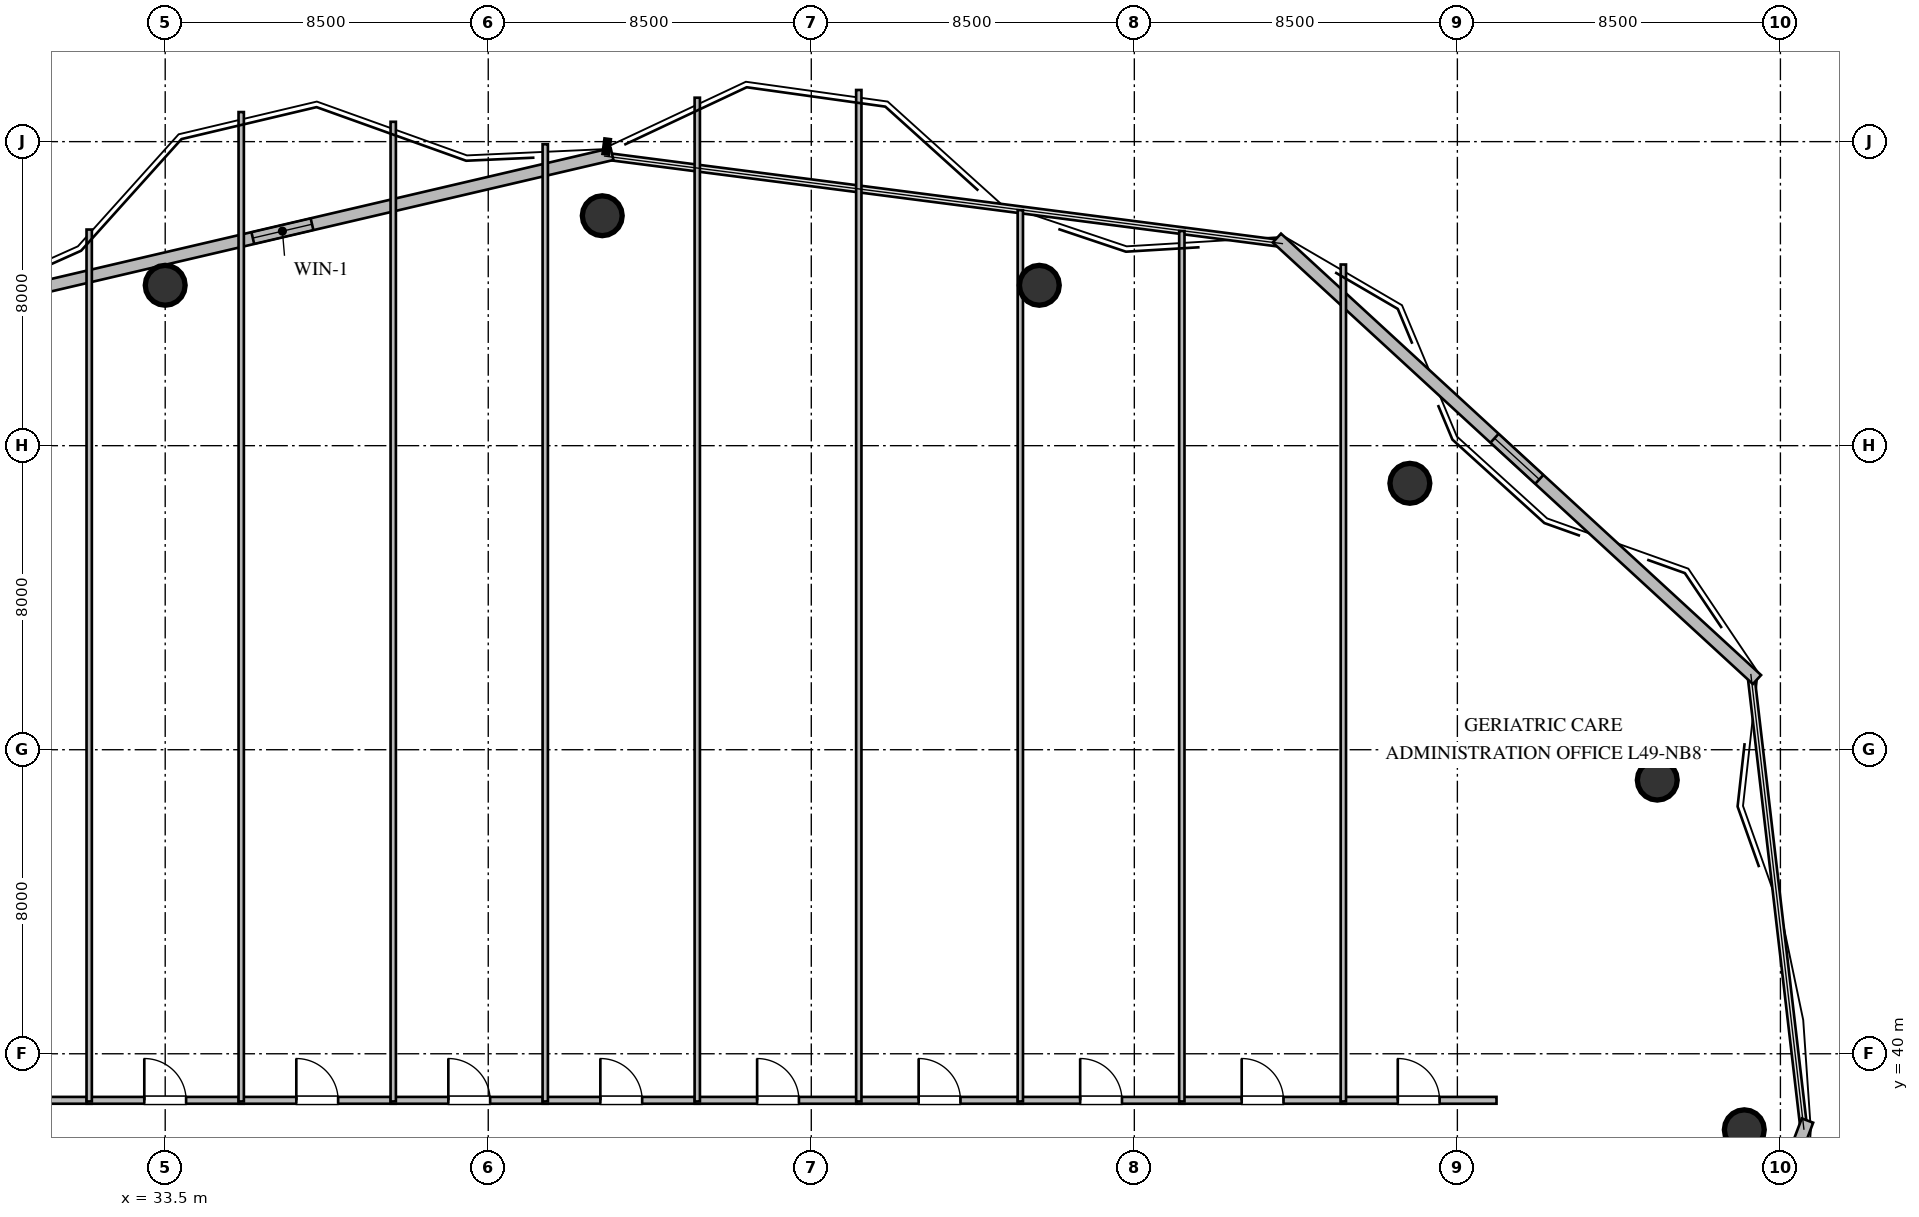
"""IFC4 building model, lengths in metres.
Left out: names, types, materials, properties, quantities, classifications, styles, units other than length and angle.
Written with IfcOpenShell. Run it as: python <this file> out.ifc"""

import sys

from ifc_helpers import new_model, si_unit, direction, frame, frame_2d, origin, origin_2d, place, context, subcontext, project, spatial, rectangle, circle, extrude, element, fill, save


model = new_model("IFC4")
c1 = context("Model", 3, precision=1e-05, world=origin(), true_north=direction((0.0, 1.0)))
c2 = subcontext(c1, "Body", "Model", "MODEL_VIEW")
j1 = project(units=[si_unit("LENGTHUNIT", "METRE"), si_unit("PLANEANGLEUNIT", "RADIAN")], contexts=[c1])
p1 = place(None, origin())
s1 = spatial("IfcSite", under=j1, at=p1, CompositionType="ELEMENT")
p2 = place(p1, origin())
s2 = spatial("IfcBuilding", under=s1, at=p2, CompositionType="ELEMENT")
p3 = place(p2, frame((0.0, 0.0, 187.2)))
s3 = spatial("IfcBuildingStorey", under=s2, at=p3, CompositionType="ELEMENT", Elevation=187.2)
for number, where, z_axis, x_axis in (
    (1, (75.05, 38.0, -0.24), (0.0, 0.0, 1.0), (1.0, 0.0, 0.0)),
    (2, (72.76, 47.2, -0.24), (0.0, 0.0, 1.0), (1.0, 0.0, 0.0)),
    (3, (66.25, 55.01, -0.24), (0.0, 0.0, 1.0), (1.0, 0.0, 0.0)),
    (4, (56.5, 60.22, -0.24), (0.0, 0.0, 1.0), (1.0, 0.0, 0.0)),
    (5, (45.0, 62.05, -0.24), (0.0, 0.0, 1.0), (1.0, 0.0, 0.0)),
    (6, (33.5, 60.22, -0.24), (0.0, 0.0, 1.0), (1.0, 0.0, 0.0)),
):
    element("IfcColumn", number, at=place(p3, frame(where, z_axis=z_axis, x_axis=x_axis)), inside=s3, PredefinedType="COLUMN", context=c2, shape_type="SweptSolid", body=[
        extrude(circle(Radius=0.525, at=origin_2d()), origin(), (0.0, 0.0, 1.0), 3.84),
    ])
p4 = place(p3, frame((76.712, 38.243, 0.0), z_axis=(0.0, 0.0, 1.0), x_axis=(-0.353659523244, -0.935374225441, 0.0)))
e7 = element("IfcWall", 7, at=p4, inside=s3, PredefinedType="STANDARD", context=c2, shape_type="SweptSolid", body=[
    extrude(rectangle(XDim=14.172, YDim=0.32, at=frame_2d((7.086, 0.0))), origin(), (0.0, 0.0, 1.0), 3.28),
])
p5 = place(p3, frame((27.909, 59.617, 0.0), z_axis=(0.0, 0.0, 1.0), x_axis=(0.973753606594, 0.227604731158, 0.0)))
e8 = element("IfcWall", 8, at=p5, inside=s3, PredefinedType="STANDARD", context=c2, shape_type="SweptSolid", body=[
    extrude(rectangle(XDim=17.817, YDim=0.32, at=frame_2d((8.908, 0.0))), origin(), (0.0, 0.0, 1.0), 3.28),
])
p6 = place(p5, frame((8.109, 0.0, 1.05)))
e9 = element("IfcOpeningElement", 9, at=p6, cuts=e8, PredefinedType="OPENING", context=c2, shape_type="SweptSolid", body=[
    extrude(rectangle(XDim=1.6, YDim=1.5, at=frame_2d((0.8, 0.75))), frame((0.0, 0.17, 0.0), z_axis=(0.0, -1.0, 0.0), x_axis=(1.0, 0.0, 0.0)), (0.0, 0.0, 1.0), 0.34),
])
p7 = place(p3, frame((62.751, 61.463, 0.0), z_axis=(0.0, 0.0, 1.0), x_axis=(0.736063690764, -0.676912286149, 0.0)))
e10 = element("IfcWall", 10, at=p7, inside=s3, PredefinedType="STANDARD", context=c2, shape_type="SweptSolid", body=[
    extrude(rectangle(XDim=17.162, YDim=0.32, at=frame_2d((8.581, 0.0))), origin(), (0.0, 0.0, 1.0), 3.28),
])
p8 = place(p7, frame((7.781, 0.0, 1.05)))
e11 = element("IfcOpeningElement", 11, at=p8, cuts=e10, PredefinedType="OPENING", context=c2, shape_type="SweptSolid", body=[
    extrude(rectangle(XDim=1.6, YDim=1.5, at=frame_2d((0.8, 0.75))), frame((0.0, 0.17, 0.0), z_axis=(0.0, -1.0, 0.0), x_axis=(1.0, 0.0, 0.0)), (0.0, 0.0, 1.0), 0.34),
])
p9 = place(p3, frame((27.685, 38.775, 0.0), z_axis=(0.0, 0.0, 1.0), x_axis=(1.0, 0.0, 0.0)))
e12 = element("IfcWall", 12, at=p9, inside=s3, PredefinedType="PARTITIONING", context=c2, shape_type="SweptSolid", body=[
    extrude(rectangle(XDim=3.88, YDim=0.18, at=frame_2d((1.94, 0.0))), origin(), (0.0, 0.0, 1.0), 3.28),
])
p10 = place(p9, frame((1.39, 0.0, 0.0)))
e13 = element("IfcOpeningElement", 13, at=p10, cuts=e12, PredefinedType="OPENING", context=c2, shape_type="SweptSolid", body=[
    extrude(rectangle(XDim=1.1, YDim=2.1, at=frame_2d((0.55, 1.05))), frame((0.0, 0.1, 0.0), z_axis=(0.0, -1.0, 0.0), x_axis=(1.0, 0.0, 0.0)), (0.0, 0.0, 1.0), 0.2),
])
p11 = place(p3, frame((31.435, 38.775, 0.0), z_axis=(0.0, 0.0, 1.0), x_axis=(1.0, 0.0, 0.0)))
e14 = element("IfcWall", 14, at=p11, inside=s3, PredefinedType="PARTITIONING", context=c2, shape_type="SweptSolid", body=[
    extrude(rectangle(XDim=4.13, YDim=0.18, at=frame_2d((2.065, 0.0))), origin(), (0.0, 0.0, 1.0), 3.28),
])
p12 = place(p11, frame((1.515, 0.0, 0.0)))
e15 = element("IfcOpeningElement", 15, at=p12, cuts=e14, PredefinedType="OPENING", context=c2, shape_type="SweptSolid", body=[
    extrude(rectangle(XDim=1.1, YDim=2.1, at=frame_2d((0.55, 1.05))), frame((0.0, 0.1, 0.0), z_axis=(0.0, -1.0, 0.0), x_axis=(1.0, 0.0, 0.0)), (0.0, 0.0, 1.0), 0.2),
])
p13 = place(p3, frame((35.435, 38.775, 0.0), z_axis=(0.0, 0.0, 1.0), x_axis=(1.0, 0.0, 0.0)))
e16 = element("IfcWall", 16, at=p13, inside=s3, PredefinedType="PARTITIONING", context=c2, shape_type="SweptSolid", body=[
    extrude(rectangle(XDim=4.13, YDim=0.18, at=frame_2d((2.065, 0.0))), origin(), (0.0, 0.0, 1.0), 3.28),
])
p14 = place(p13, frame((1.515, 0.0, 0.0)))
e17 = element("IfcOpeningElement", 17, at=p14, cuts=e16, PredefinedType="OPENING", context=c2, shape_type="SweptSolid", body=[
    extrude(rectangle(XDim=1.1, YDim=2.1, at=frame_2d((0.55, 1.05))), frame((0.0, 0.1, 0.0), z_axis=(0.0, -1.0, 0.0), x_axis=(1.0, 0.0, 0.0)), (0.0, 0.0, 1.0), 0.2),
])
p15 = place(p3, frame((39.435, 38.775, 0.0), z_axis=(0.0, 0.0, 1.0), x_axis=(1.0, 0.0, 0.0)))
e18 = element("IfcWall", 18, at=p15, inside=s3, PredefinedType="PARTITIONING", context=c2, shape_type="SweptSolid", body=[
    extrude(rectangle(XDim=4.13, YDim=0.18, at=frame_2d((2.065, 0.0))), origin(), (0.0, 0.0, 1.0), 3.28),
])
p16 = place(p15, frame((1.515, 0.0, 0.0)))
e19 = element("IfcOpeningElement", 19, at=p16, cuts=e18, PredefinedType="OPENING", context=c2, shape_type="SweptSolid", body=[
    extrude(rectangle(XDim=1.1, YDim=2.1, at=frame_2d((0.55, 1.05))), frame((0.0, 0.1, 0.0), z_axis=(0.0, -1.0, 0.0), x_axis=(1.0, 0.0, 0.0)), (0.0, 0.0, 1.0), 0.2),
])
p17 = place(p3, frame((43.435, 38.775, 0.0), z_axis=(0.0, 0.0, 1.0), x_axis=(1.0, 0.0, 0.0)))
e20 = element("IfcWall", 20, at=p17, inside=s3, PredefinedType="PARTITIONING", context=c2, shape_type="SweptSolid", body=[
    extrude(rectangle(XDim=4.13, YDim=0.18, at=frame_2d((2.065, 0.0))), origin(), (0.0, 0.0, 1.0), 3.28),
])
p18 = place(p17, frame((1.515, 0.0, 0.0)))
e21 = element("IfcOpeningElement", 21, at=p18, cuts=e20, PredefinedType="OPENING", context=c2, shape_type="SweptSolid", body=[
    extrude(rectangle(XDim=1.1, YDim=2.1, at=frame_2d((0.55, 1.05))), frame((0.0, 0.1, 0.0), z_axis=(0.0, -1.0, 0.0), x_axis=(1.0, 0.0, 0.0)), (0.0, 0.0, 1.0), 0.2),
])
p19 = place(p3, frame((47.435, 38.775, 0.0), z_axis=(0.0, 0.0, 1.0), x_axis=(1.0, 0.0, 0.0)))
e22 = element("IfcWall", 22, at=p19, inside=s3, PredefinedType="PARTITIONING", context=c2, shape_type="SweptSolid", body=[
    extrude(rectangle(XDim=4.38, YDim=0.18, at=frame_2d((2.19, 0.0))), origin(), (0.0, 0.0, 1.0), 3.28),
])
p20 = place(p19, frame((1.64, 0.0, 0.0)))
e23 = element("IfcOpeningElement", 23, at=p20, cuts=e22, PredefinedType="OPENING", context=c2, shape_type="SweptSolid", body=[
    extrude(rectangle(XDim=1.1, YDim=2.1, at=frame_2d((0.55, 1.05))), frame((0.0, 0.1, 0.0), z_axis=(0.0, -1.0, 0.0), x_axis=(1.0, 0.0, 0.0)), (0.0, 0.0, 1.0), 0.2),
])
p21 = place(p3, frame((51.685, 38.775, 0.0), z_axis=(0.0, 0.0, 1.0), x_axis=(1.0, 0.0, 0.0)))
e24 = element("IfcWall", 24, at=p21, inside=s3, PredefinedType="PARTITIONING", context=c2, shape_type="SweptSolid", body=[
    extrude(rectangle(XDim=4.38, YDim=0.18, at=frame_2d((2.19, 0.0))), origin(), (0.0, 0.0, 1.0), 3.28),
])
p22 = place(p21, frame((1.64, 0.0, 0.0)))
e25 = element("IfcOpeningElement", 25, at=p22, cuts=e24, PredefinedType="OPENING", context=c2, shape_type="SweptSolid", body=[
    extrude(rectangle(XDim=1.1, YDim=2.1, at=frame_2d((0.55, 1.05))), frame((0.0, 0.1, 0.0), z_axis=(0.0, -1.0, 0.0), x_axis=(1.0, 0.0, 0.0)), (0.0, 0.0, 1.0), 0.2),
])
p23 = place(p3, frame((55.935, 38.775, 0.0), z_axis=(0.0, 0.0, 1.0), x_axis=(1.0, 0.0, 0.0)))
e26 = element("IfcWall", 26, at=p23, inside=s3, PredefinedType="PARTITIONING", context=c2, shape_type="SweptSolid", body=[
    extrude(rectangle(XDim=4.38, YDim=0.18, at=frame_2d((2.19, 0.0))), origin(), (0.0, 0.0, 1.0), 3.28),
])
p24 = place(p23, frame((1.64, 0.0, 0.0)))
e27 = element("IfcOpeningElement", 27, at=p24, cuts=e26, PredefinedType="OPENING", context=c2, shape_type="SweptSolid", body=[
    extrude(rectangle(XDim=1.1, YDim=2.1, at=frame_2d((0.55, 1.05))), frame((0.0, 0.1, 0.0), z_axis=(0.0, -1.0, 0.0), x_axis=(1.0, 0.0, 0.0)), (0.0, 0.0, 1.0), 0.2),
])
p25 = place(p3, frame((60.185, 38.775, 0.0), z_axis=(0.0, 0.0, 1.0), x_axis=(1.0, 0.0, 0.0)))
e28 = element("IfcWall", 28, at=p25, inside=s3, PredefinedType="PARTITIONING", context=c2, shape_type="SweptSolid", body=[
    extrude(rectangle(XDim=4.38, YDim=0.18, at=frame_2d((2.19, 0.0))), origin(), (0.0, 0.0, 1.0), 3.28),
])
p26 = place(p25, frame((1.64, 0.0, 0.0)))
e29 = element("IfcOpeningElement", 29, at=p26, cuts=e28, PredefinedType="OPENING", context=c2, shape_type="SweptSolid", body=[
    extrude(rectangle(XDim=1.1, YDim=2.1, at=frame_2d((0.55, 1.05))), frame((0.0, 0.1, 0.0), z_axis=(0.0, -1.0, 0.0), x_axis=(1.0, 0.0, 0.0)), (0.0, 0.0, 1.0), 0.2),
])
p27 = place(p3, frame((64.435, 38.775, 0.0), z_axis=(0.0, 0.0, 1.0), x_axis=(1.0, 0.0, 0.0)))
e30 = element("IfcWall", 30, at=p27, inside=s3, PredefinedType="PARTITIONING", context=c2, shape_type="SweptSolid", body=[
    extrude(rectangle(XDim=4.095, YDim=0.18, at=frame_2d((2.047, 0.0))), origin(), (0.0, 0.0, 1.0), 3.28),
])
p28 = place(p27, frame((1.497, 0.0, 0.0)))
e31 = element("IfcOpeningElement", 31, at=p28, cuts=e30, PredefinedType="OPENING", context=c2, shape_type="SweptSolid", body=[
    extrude(rectangle(XDim=1.1, YDim=2.1, at=frame_2d((0.55, 1.05))), frame((0.0, 0.1, 0.0), z_axis=(0.0, -1.0, 0.0), x_axis=(1.0, 0.0, 0.0)), (0.0, 0.0, 1.0), 0.2),
])
p29 = place(p3, frame((31.5, 61.687, 0.0), z_axis=(0.0, 0.0, 1.0), x_axis=(0.0, -1.0, 0.0)))
e32 = element("IfcWall", 32, at=p29, inside=s3, PredefinedType="PARTITIONING", context=c2, shape_type="SweptSolid", body=[
    extrude(rectangle(XDim=22.942, YDim=0.14, at=frame_2d((11.471, 0.0))), origin(), (0.0, 0.0, 1.0), 3.28),
])
p30 = place(p3, frame((35.5, 64.778, 0.0), z_axis=(0.0, 0.0, 1.0), x_axis=(0.0, -1.0, 0.0)))
e33 = element("IfcWall", 33, at=p30, inside=s3, PredefinedType="PARTITIONING", context=c2, shape_type="SweptSolid", body=[
    extrude(rectangle(XDim=26.033, YDim=0.14, at=frame_2d((13.017, 0.0))), origin(), (0.0, 0.0, 1.0), 2.81),
])
p31 = place(p3, frame((39.5, 64.522, 0.0), z_axis=(0.0, 0.0, 1.0), x_axis=(0.0, -1.0, 0.0)))
e34 = element("IfcWall", 34, at=p31, inside=s3, PredefinedType="PARTITIONING", context=c2, shape_type="SweptSolid", body=[
    extrude(rectangle(XDim=25.777, YDim=0.14, at=frame_2d((12.888, 0.0))), origin(), (0.0, 0.0, 1.0), 3.28),
])
p32 = place(p3, frame((43.5, 63.931, 0.0), z_axis=(0.0, 0.0, 1.0), x_axis=(0.0, -1.0, 0.0)))
e35 = element("IfcWall", 35, at=p32, inside=s3, PredefinedType="PARTITIONING", context=c2, shape_type="SweptSolid", body=[
    extrude(rectangle(XDim=25.186, YDim=0.14, at=frame_2d((12.593, 0.0))), origin(), (0.0, 0.0, 1.0), 2.81),
])
p33 = place(p3, frame((47.5, 65.156, 0.0), z_axis=(0.0, 0.0, 1.0), x_axis=(0.0, -1.0, 0.0)))
e36 = element("IfcWall", 36, at=p33, inside=s3, PredefinedType="PARTITIONING", context=c2, shape_type="SweptSolid", body=[
    extrude(rectangle(XDim=26.411, YDim=0.14, at=frame_2d((13.206, 0.0))), origin(), (0.0, 0.0, 1.0), 3.28),
])
p34 = place(p3, frame((51.75, 65.359, 0.0), z_axis=(0.0, 0.0, 1.0), x_axis=(0.0, -1.0, 0.0)))
e37 = element("IfcWall", 37, at=p34, inside=s3, PredefinedType="PARTITIONING", context=c2, shape_type="SweptSolid", body=[
    extrude(rectangle(XDim=26.614, YDim=0.14, at=frame_2d((13.307, 0.0))), origin(), (0.0, 0.0, 1.0), 3.28),
])
p35 = place(p3, frame((56.0, 62.197, 0.0), z_axis=(0.0, 0.0, 1.0), x_axis=(0.0, -1.0, 0.0)))
e38 = element("IfcWall", 38, at=p35, inside=s3, PredefinedType="PARTITIONING", context=c2, shape_type="SweptSolid", body=[
    extrude(rectangle(XDim=23.452, YDim=0.14, at=frame_2d((11.726, 0.0))), origin(), (0.0, 0.0, 1.0), 3.28),
])
p36 = place(p3, frame((60.25, 61.648, 0.0), z_axis=(0.0, 0.0, 1.0), x_axis=(0.0, -1.0, 0.0)))
e39 = element("IfcWall", 39, at=p36, inside=s3, PredefinedType="PARTITIONING", context=c2, shape_type="SweptSolid", body=[
    extrude(rectangle(XDim=22.903, YDim=0.14, at=frame_2d((11.451, 0.0))), origin(), (0.0, 0.0, 1.0), 2.916),
])
p37 = place(p3, frame((64.5, 60.767, 0.0), z_axis=(0.0, 0.0, 1.0), x_axis=(0.0, -1.0, 0.0)))
e40 = element("IfcWall", 40, at=p37, inside=s3, PredefinedType="PARTITIONING", context=c2, shape_type="SweptSolid", body=[
    extrude(rectangle(XDim=22.022, YDim=0.14, at=frame_2d((11.011, 0.0))), origin(), (0.0, 0.0, 1.0), 3.28),
])
p38 = place(p6, origin())
e41 = element("IfcWindow", 41, at=p38, inside=s3, PartitioningType="SINGLE_PANEL", PredefinedType="WINDOW", context=c2, shape_type="SweptSolid", body=[
    extrude(rectangle(XDim=1.6, YDim=1.5, at=frame_2d((0.8, 0.75))), frame((0.0, 0.03, 0.0), z_axis=(0.0, -1.0, 0.0), x_axis=(1.0, 0.0, 0.0)), (0.0, 0.0, 1.0), 0.06),
])
fill(e9, e41)
p39 = place(p8, origin())
e42 = element("IfcWindow", 42, at=p39, inside=s3, PartitioningType="SINGLE_PANEL", PredefinedType="WINDOW", context=c2, shape_type="SweptSolid", body=[
    extrude(rectangle(XDim=1.6, YDim=1.5, at=frame_2d((0.8, 0.75))), frame((0.0, 0.03, 0.0), z_axis=(0.0, -1.0, 0.0), x_axis=(1.0, 0.0, 0.0)), (0.0, 0.0, 1.0), 0.06),
])
fill(e11, e42)
p40 = place(p12, origin())
e43 = element("IfcDoor", 43, at=p40, inside=s3, OperationType="SINGLE_SWING_LEFT", PredefinedType="DOOR", context=c2, shape_type="SweptSolid", body=[
    extrude(rectangle(XDim=1.1, YDim=2.1, at=frame_2d((0.55, 1.05))), frame((0.0, 0.025, 0.0), z_axis=(0.0, -1.0, 0.0), x_axis=(1.0, 0.0, 0.0)), (0.0, 0.0, 1.0), 0.05),
])
fill(e15, e43)
p41 = place(p14, origin())
e44 = element("IfcDoor", 44, at=p41, inside=s3, OperationType="SINGLE_SWING_LEFT", PredefinedType="DOOR", context=c2, shape_type="SweptSolid", body=[
    extrude(rectangle(XDim=1.1, YDim=2.1, at=frame_2d((0.55, 1.05))), frame((0.0, 0.025, 0.0), z_axis=(0.0, -1.0, 0.0), x_axis=(1.0, 0.0, 0.0)), (0.0, 0.0, 1.0), 0.05),
])
fill(e17, e44)
p42 = place(p16, origin())
e45 = element("IfcDoor", 45, at=p42, inside=s3, OperationType="SINGLE_SWING_LEFT", PredefinedType="DOOR", context=c2, shape_type="SweptSolid", body=[
    extrude(rectangle(XDim=1.1, YDim=2.1, at=frame_2d((0.55, 1.05))), frame((0.0, 0.025, 0.0), z_axis=(0.0, -1.0, 0.0), x_axis=(1.0, 0.0, 0.0)), (0.0, 0.0, 1.0), 0.05),
])
fill(e19, e45)
p43 = place(p18, origin())
e46 = element("IfcDoor", 46, at=p43, inside=s3, OperationType="SINGLE_SWING_LEFT", PredefinedType="DOOR", context=c2, shape_type="SweptSolid", body=[
    extrude(rectangle(XDim=1.1, YDim=2.1, at=frame_2d((0.55, 1.05))), frame((0.0, 0.025, 0.0), z_axis=(0.0, -1.0, 0.0), x_axis=(1.0, 0.0, 0.0)), (0.0, 0.0, 1.0), 0.05),
])
fill(e21, e46)
p44 = place(p20, origin())
e47 = element("IfcDoor", 47, at=p44, inside=s3, OperationType="SINGLE_SWING_LEFT", PredefinedType="DOOR", context=c2, shape_type="SweptSolid", body=[
    extrude(rectangle(XDim=1.1, YDim=2.1, at=frame_2d((0.55, 1.05))), frame((0.0, 0.025, 0.0), z_axis=(0.0, -1.0, 0.0), x_axis=(1.0, 0.0, 0.0)), (0.0, 0.0, 1.0), 0.05),
])
fill(e23, e47)
p45 = place(p22, origin())
e48 = element("IfcDoor", 48, at=p45, inside=s3, OperationType="SINGLE_SWING_LEFT", PredefinedType="DOOR", context=c2, shape_type="SweptSolid", body=[
    extrude(rectangle(XDim=1.1, YDim=2.1, at=frame_2d((0.55, 1.05))), frame((0.0, 0.025, 0.0), z_axis=(0.0, -1.0, 0.0), x_axis=(1.0, 0.0, 0.0)), (0.0, 0.0, 1.0), 0.05),
])
fill(e25, e48)
p46 = place(p24, origin())
e49 = element("IfcDoor", 49, at=p46, inside=s3, OperationType="SINGLE_SWING_LEFT", PredefinedType="DOOR", context=c2, shape_type="SweptSolid", body=[
    extrude(rectangle(XDim=1.1, YDim=2.1, at=frame_2d((0.55, 1.05))), frame((0.0, 0.025, 0.0), z_axis=(0.0, -1.0, 0.0), x_axis=(1.0, 0.0, 0.0)), (0.0, 0.0, 1.0), 0.05),
])
fill(e27, e49)
p47 = place(p26, origin())
e50 = element("IfcDoor", 50, at=p47, inside=s3, OperationType="SINGLE_SWING_LEFT", PredefinedType="DOOR", context=c2, shape_type="SweptSolid", body=[
    extrude(rectangle(XDim=1.1, YDim=2.1, at=frame_2d((0.55, 1.05))), frame((0.0, 0.025, 0.0), z_axis=(0.0, -1.0, 0.0), x_axis=(1.0, 0.0, 0.0)), (0.0, 0.0, 1.0), 0.05),
])
fill(e29, e50)
p48 = place(p28, origin())
e51 = element("IfcDoor", 51, at=p48, inside=s3, OperationType="SINGLE_SWING_LEFT", PredefinedType="DOOR", context=c2, shape_type="SweptSolid", body=[
    extrude(rectangle(XDim=1.1, YDim=2.1, at=frame_2d((0.55, 1.05))), frame((0.0, 0.025, 0.0), z_axis=(0.0, -1.0, 0.0), x_axis=(1.0, 0.0, 0.0)), (0.0, 0.0, 1.0), 0.05),
])
fill(e31, e51)
save(model, sys.argv[1])
